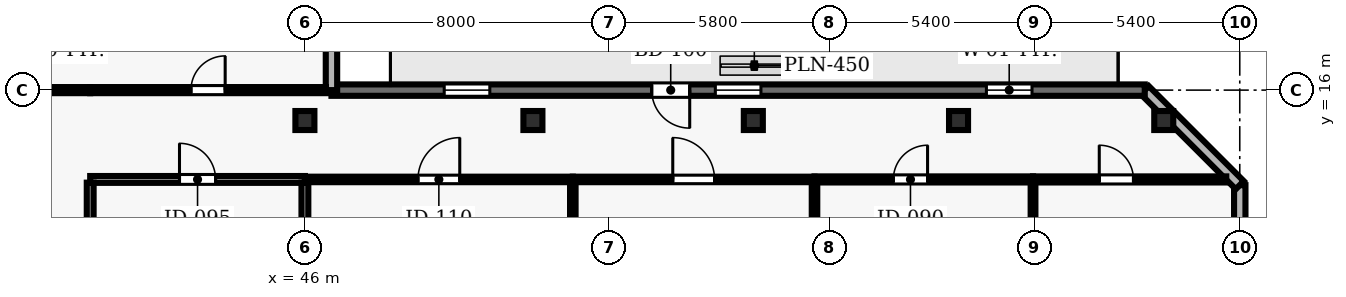
"""IFC4 building model, lengths in metres.
Left out: names, types, materials, properties, quantities, classifications, styles, units other than length and angle.
Written with IfcOpenShell. Run it as: python <this file> out.ifc"""

import sys

from ifc_helpers import new_model, si_unit, direction, frame, frame_2d, origin, origin_2d, place, context, subcontext, project, spatial, rectangle, hollow_rectangle, extrude, element, fill, save


model = new_model("IFC4")
c1 = context("Model", 3, precision=1e-05, world=origin(), true_north=direction((0.0, 1.0)))
c2 = subcontext(c1, "Body", "Model", "MODEL_VIEW")
j1 = project(units=[si_unit("LENGTHUNIT", "METRE"), si_unit("PLANEANGLEUNIT", "RADIAN")], contexts=[c1])
p1 = place(None, origin())
s1 = spatial("IfcSite", under=j1, at=p1, CompositionType="ELEMENT")
p2 = place(p1, origin())
s2 = spatial("IfcBuilding", under=s1, at=p2, CompositionType="ELEMENT")
p3 = place(p2, frame((0.0, 0.0, 134.6)))
s3 = spatial("IfcBuildingStorey", under=s2, at=p3, CompositionType="ELEMENT", Elevation=134.6)
for number, where, z_axis, x_axis in (
    (1, (46.0, 15.2, 0.0), (0.0, 0.0, 1.0), (1.0, 0.0, 0.0)),
    (2, (52.0, 15.2, 0.0), (0.0, 0.0, 1.0), (1.0, 0.0, 0.0)),
    (3, (57.8, 15.2, 0.0), (0.0, 0.0, 1.0), (1.0, 0.0, 0.0)),
    (4, (63.2, 15.2, 0.0), (0.0, 0.0, 1.0), (1.0, 0.0, 0.0)),
    (5, (68.6, 15.2, 0.0), (0.0, 0.0, 1.0), (1.0, 0.0, 0.0)),
):
    element("IfcColumn", number, at=place(p3, frame(where, z_axis=z_axis, x_axis=x_axis)), inside=s3, PredefinedType="COLUMN", context=c2, shape_type="SweptSolid", body=[
        extrude(hollow_rectangle(XDim=0.5, YDim=0.5, WallThickness=0.025, at=origin_2d()), origin(), (0.0, 0.0, 1.0), 3.9),
    ])
p4 = place(p3, frame((70.6, 2.5, 0.0), z_axis=(0.0, 0.0, 1.0), x_axis=(0.0, 1.0, 0.0)))
e6 = element("IfcWall", 6, at=p4, inside=s3, PredefinedType="SOLIDWALL", context=c2, shape_type="SweptSolid", body=[
    extrude(rectangle(XDim=11.0, YDim=0.3, at=frame_2d((5.5, 0.0))), origin(), (0.0, 0.0, 1.0), 3.69),
])
p5 = place(p4, frame((1.55, 0.0, 0.9)))
e7 = element("IfcOpeningElement", 7, at=p5, cuts=e6, PredefinedType="OPENING", context=c2, shape_type="SweptSolid", body=[
    extrude(rectangle(XDim=2.4, YDim=2.2, at=frame_2d((1.2, 1.1))), frame((0.0, 0.16, 0.0), z_axis=(0.0, -1.0, 0.0), x_axis=(1.0, 0.0, 0.0)), (0.0, 0.0, 1.0), 0.32),
])
p6 = place(p4, frame((7.05, 0.0, 0.9)))
e8 = element("IfcOpeningElement", 8, at=p6, cuts=e6, PredefinedType="OPENING", context=c2, shape_type="SweptSolid", body=[
    extrude(rectangle(XDim=2.4, YDim=2.2, at=frame_2d((1.2, 1.1))), frame((0.0, 0.16, 0.0), z_axis=(0.0, -1.0, 0.0), x_axis=(1.0, 0.0, 0.0)), (0.0, 0.0, 1.0), 0.32),
])
p7 = place(p3, frame((70.6, 13.5, 0.0), z_axis=(0.0, 0.0, 1.0), x_axis=(-0.707106781187, 0.707106781187, 0.0)))
e9 = element("IfcWall", 9, at=p7, inside=s3, PredefinedType="SOLIDWALL", context=c2, shape_type="SweptSolid", body=[
    extrude(rectangle(XDim=3.536, YDim=0.3, at=frame_2d((1.768, 0.0))), origin(), (0.0, 0.0, 1.0), 3.69),
])
p8 = place(p3, frame((68.1, 16.0, 0.0), z_axis=(0.0, 0.0, 1.0), x_axis=(-1.0, 0.0, 0.0)))
e10 = element("IfcWall", 10, at=p8, inside=s3, PredefinedType="SOLIDWALL", context=c2, shape_type="SweptSolid", body=[
    extrude(rectangle(XDim=21.401, YDim=0.3, at=frame_2d((10.701, 0.0))), origin(), (0.0, 0.0, 1.0), 3.69),
])
p9 = place(p8, frame((11.974, 0.0, 0.0)))
e11 = element("IfcOpeningElement", 11, at=p9, cuts=e10, PredefinedType="OPENING", context=c2, shape_type="SweptSolid", body=[
    extrude(rectangle(XDim=1.0, YDim=2.2, at=frame_2d((0.5, 1.1))), frame((0.0, 0.16, 0.0), z_axis=(0.0, -1.0, 0.0), x_axis=(1.0, 0.0, 0.0)), (0.0, 0.0, 1.0), 0.32),
])
p10 = place(p8, frame((2.967, 0.0, 0.9)))
e12 = element("IfcOpeningElement", 12, at=p10, cuts=e10, PredefinedType="OPENING", context=c2, shape_type="SweptSolid", body=[
    extrude(rectangle(XDim=1.2, YDim=1.6, at=frame_2d((0.6, 0.8))), frame((0.0, 0.16, 0.0), z_axis=(0.0, -1.0, 0.0), x_axis=(1.0, 0.0, 0.0)), (0.0, 0.0, 1.0), 0.32),
])
p11 = place(p8, frame((10.1, 0.0, 0.9)))
e13 = element("IfcOpeningElement", 13, at=p11, cuts=e10, PredefinedType="OPENING", context=c2, shape_type="SweptSolid", body=[
    extrude(rectangle(XDim=1.2, YDim=1.6, at=frame_2d((0.6, 0.8))), frame((0.0, 0.16, 0.0), z_axis=(0.0, -1.0, 0.0), x_axis=(1.0, 0.0, 0.0)), (0.0, 0.0, 1.0), 0.32),
])
p12 = place(p8, frame((17.234, 0.0, 0.9)))
e14 = element("IfcOpeningElement", 14, at=p12, cuts=e10, PredefinedType="OPENING", context=c2, shape_type="SweptSolid", body=[
    extrude(rectangle(XDim=1.2, YDim=1.6, at=frame_2d((0.6, 0.8))), frame((0.0, 0.16, 0.0), z_axis=(0.0, -1.0, 0.0), x_axis=(1.0, 0.0, 0.0)), (0.0, 0.0, 1.0), 0.32),
])
p13 = place(p3, frame((46.699, 16.0, 0.0), z_axis=(0.0, 0.0, 1.0), x_axis=(0.0, 1.0, 0.0)))
e15 = element("IfcWall", 15, at=p13, inside=s3, PredefinedType="SOLIDWALL", context=c2, shape_type="SweptSolid", body=[
    extrude(rectangle(XDim=9.25, YDim=0.3, at=frame_2d((4.625, 0.0))), origin(), (0.0, 0.0, 1.0), 3.69),
])
p14 = place(p13, frame((3.875, 0.0, 0.9)))
e16 = element("IfcOpeningElement", 16, at=p14, cuts=e15, PredefinedType="OPENING", context=c2, shape_type="SweptSolid", body=[
    extrude(rectangle(XDim=1.5, YDim=1.6, at=frame_2d((0.75, 0.8))), frame((0.0, 0.16, 0.0), z_axis=(0.0, -1.0, 0.0), x_axis=(1.0, 0.0, 0.0)), (0.0, 0.0, 1.0), 0.32),
])
p15 = place(p3, frame((40.35, 13.65, 0.0), z_axis=(0.0, 0.0, 1.0), x_axis=(1.0, 0.0, 0.0)))
e17 = element("IfcWall", 17, at=p15, inside=s3, PredefinedType="PARTITIONING", context=c2, shape_type="SweptSolid", body=[
    extrude(rectangle(XDim=5.65, YDim=0.18, at=frame_2d((2.825, 0.0))), origin(), (0.0, 0.0, 1.0), 3.69),
])
p16 = place(p15, frame((2.35, 0.0, 0.0)))
e18 = element("IfcOpeningElement", 18, at=p16, cuts=e17, PredefinedType="OPENING", context=c2, shape_type="SweptSolid", body=[
    extrude(rectangle(XDim=0.95, YDim=2.1, at=frame_2d((0.475, 1.05))), frame((0.0, 0.1, 0.0), z_axis=(0.0, -1.0, 0.0), x_axis=(1.0, 0.0, 0.0)), (0.0, 0.0, 1.0), 0.2),
])
p17 = place(p3, frame((40.35, 16.0, 0.0), z_axis=(0.0, 0.0, 1.0), x_axis=(-1.0, 0.0, 0.0)))
e19 = element("IfcWall", 19, at=p17, inside=s3, PredefinedType="PARTITIONING", context=c2, shape_type="SweptSolid", body=[
    extrude(rectangle(XDim=2.3, YDim=0.16, at=frame_2d((1.15, 0.0))), origin(), (0.0, 0.0, 1.0), 3.69),
])
p18 = place(p3, frame((40.35, 16.0, 0.0), z_axis=(0.0, 0.0, 1.0), x_axis=(1.0, 0.0, 0.0)))
e20 = element("IfcWall", 20, at=p18, inside=s3, PredefinedType="PARTITIONING", context=c2, shape_type="SweptSolid", body=[
    extrude(rectangle(XDim=6.204, YDim=0.16, at=frame_2d((3.102, 0.0))), origin(), (0.0, 0.0, 1.0), 3.39),
])
p19 = place(p18, frame((2.652, 0.0, 0.0)))
e21 = element("IfcOpeningElement", 21, at=p19, cuts=e20, PredefinedType="OPENING", context=c2, shape_type="SweptSolid", body=[
    extrude(rectangle(XDim=0.9, YDim=2.1, at=frame_2d((0.45, 1.05))), frame((0.0, 0.09, 0.0), z_axis=(0.0, -1.0, 0.0), x_axis=(1.0, 0.0, 0.0)), (0.0, 0.0, 1.0), 0.18),
])
p20 = place(p3, frame((46.0, 13.65, 0.0), z_axis=(0.0, 0.0, 1.0), x_axis=(1.0, 0.0, 0.0)))
e22 = element("IfcWall", 22, at=p20, inside=s3, PredefinedType="PARTITIONING", context=c2, shape_type="SweptSolid", body=[
    extrude(rectangle(XDim=7.05, YDim=0.145, at=frame_2d((3.525, 0.0))), origin(), (0.0, 0.0, 1.0), 3.69),
])
p21 = place(p20, frame((2.975, 0.0, 0.0)))
e23 = element("IfcOpeningElement", 23, at=p21, cuts=e22, PredefinedType="OPENING", context=c2, shape_type="SweptSolid", body=[
    extrude(rectangle(XDim=1.1, YDim=2.15, at=frame_2d((0.55, 1.075))), frame((0.0, 0.083, 0.0), z_axis=(0.0, -1.0, 0.0), x_axis=(1.0, 0.0, 0.0)), (0.0, 0.0, 1.0), 0.165),
])
p22 = place(p3, frame((53.05, 13.65, 0.0), z_axis=(0.0, 0.0, 1.0), x_axis=(1.0, 0.0, 0.0)))
e24 = element("IfcWall", 24, at=p22, inside=s3, PredefinedType="PARTITIONING", context=c2, shape_type="SweptSolid", body=[
    extrude(rectangle(XDim=6.36, YDim=0.145, at=frame_2d((3.18, 0.0))), origin(), (0.0, 0.0, 1.0), 3.69),
])
p23 = place(p22, frame((2.63, 0.0, 0.0)))
e25 = element("IfcOpeningElement", 25, at=p23, cuts=e24, PredefinedType="OPENING", context=c2, shape_type="SweptSolid", body=[
    extrude(rectangle(XDim=1.1, YDim=2.15, at=frame_2d((0.55, 1.075))), frame((0.0, 0.083, 0.0), z_axis=(0.0, -1.0, 0.0), x_axis=(1.0, 0.0, 0.0)), (0.0, 0.0, 1.0), 0.165),
])
p24 = place(p3, frame((59.41, 13.65, 0.0), z_axis=(0.0, 0.0, 1.0), x_axis=(1.0, 0.0, 0.0)))
e26 = element("IfcWall", 26, at=p24, inside=s3, PredefinedType="PARTITIONING", context=c2, shape_type="SweptSolid", body=[
    extrude(rectangle(XDim=5.75, YDim=0.16, at=frame_2d((2.875, 0.0))), origin(), (0.0, 0.0, 1.0), 3.69),
])
p25 = place(p24, frame((2.075, 0.0, 0.0)))
e27 = element("IfcOpeningElement", 27, at=p25, cuts=e26, PredefinedType="OPENING", context=c2, shape_type="SweptSolid", body=[
    extrude(rectangle(XDim=0.9, YDim=2.1, at=frame_2d((0.45, 1.05))), frame((0.0, 0.09, 0.0), z_axis=(0.0, -1.0, 0.0), x_axis=(1.0, 0.0, 0.0)), (0.0, 0.0, 1.0), 0.18),
])
p26 = place(p3, frame((65.16, 13.65, 0.0), z_axis=(0.0, 0.0, 1.0), x_axis=(1.0, 0.0, 0.0)))
e28 = element("IfcWall", 28, at=p26, inside=s3, PredefinedType="PARTITIONING", context=c2, shape_type="SweptSolid", body=[
    extrude(rectangle(XDim=5.085, YDim=0.16, at=frame_2d((2.542, 0.0))), origin(), (0.0, 0.0, 1.0), 3.69),
])
p27 = place(p26, frame((1.743, 0.0, 0.0)))
e29 = element("IfcOpeningElement", 29, at=p27, cuts=e28, PredefinedType="OPENING", context=c2, shape_type="SweptSolid", body=[
    extrude(rectangle(XDim=0.9, YDim=2.1, at=frame_2d((0.45, 1.05))), frame((0.0, 0.09, 0.0), z_axis=(0.0, -1.0, 0.0), x_axis=(1.0, 0.0, 0.0)), (0.0, 0.0, 1.0), 0.18),
])
p28 = place(p3, frame((40.35, 8.035, 0.0), z_axis=(0.0, 0.0, 1.0), x_axis=(0.0, 1.0, 0.0)))
e30 = element("IfcWall", 30, at=p28, inside=s3, PredefinedType="PARTITIONING", context=c2, shape_type="SweptSolid", body=[
    extrude(rectangle(XDim=5.53, YDim=0.18, at=frame_2d((2.765, 0.0))), origin(), (0.0, 0.0, 1.0), 3.69),
])
p29 = place(p3, frame((46.0, 8.035, 0.0), z_axis=(0.0, 0.0, 1.0), x_axis=(0.0, 1.0, 0.0)))
e31 = element("IfcWall", 31, at=p29, inside=s3, PredefinedType="PARTITIONING", context=c2, shape_type="SweptSolid", body=[
    extrude(rectangle(XDim=5.53, YDim=0.18, at=frame_2d((2.765, 0.0))), origin(), (0.0, 0.0, 1.0), 3.074),
])
p30 = place(p3, frame((53.05, 8.035, 0.0), z_axis=(0.0, 0.0, 1.0), x_axis=(0.0, 1.0, 0.0)))
e32 = element("IfcWall", 32, at=p30, inside=s3, PredefinedType="PARTITIONING", context=c2, shape_type="SweptSolid", body=[
    extrude(rectangle(XDim=5.547, YDim=0.145, at=frame_2d((2.773, 0.0))), origin(), (0.0, 0.0, 1.0), 3.69),
])
p31 = place(p3, frame((59.41, 8.035, 0.0), z_axis=(0.0, 0.0, 1.0), x_axis=(0.0, 1.0, 0.0)))
e33 = element("IfcWall", 33, at=p31, inside=s3, PredefinedType="PARTITIONING", context=c2, shape_type="SweptSolid", body=[
    extrude(rectangle(XDim=5.54, YDim=0.145, at=frame_2d((2.77, 0.0))), origin(), (0.0, 0.0, 1.0), 3.69),
])
p32 = place(p3, frame((65.16, 8.018, 0.0), z_axis=(0.0, 0.0, 1.0), x_axis=(0.0, 1.0, 0.0)))
e34 = element("IfcWall", 34, at=p32, inside=s3, PredefinedType="PARTITIONING", context=c2, shape_type="SweptSolid", body=[
    extrude(rectangle(XDim=5.557, YDim=0.125, at=frame_2d((2.778, 0.0))), origin(), (0.0, 0.0, 1.0), 3.69),
])
p33 = place(p9, origin())
e35 = element("IfcDoor", 35, at=p33, inside=s3, OperationType="SINGLE_SWING_LEFT", PredefinedType="DOOR", context=c2, shape_type="SweptSolid", body=[
    extrude(rectangle(XDim=1.0, YDim=2.2, at=frame_2d((0.5, 1.1))), frame((0.0, 0.025, 0.0), z_axis=(0.0, -1.0, 0.0), x_axis=(1.0, 0.0, 0.0)), (0.0, 0.0, 1.0), 0.05),
])
fill(e11, e35)
p34 = place(p10, origin())
e36 = element("IfcWindow", 36, at=p34, inside=s3, PartitioningType="SINGLE_PANEL", PredefinedType="WINDOW", context=c2, shape_type="SweptSolid", body=[
    extrude(rectangle(XDim=1.2, YDim=1.6, at=frame_2d((0.6, 0.8))), frame((0.0, 0.03, 0.0), z_axis=(0.0, -1.0, 0.0), x_axis=(1.0, 0.0, 0.0)), (0.0, 0.0, 1.0), 0.06),
])
fill(e12, e36)
p35 = place(p11, origin())
e37 = element("IfcWindow", 37, at=p35, inside=s3, PartitioningType="SINGLE_PANEL", PredefinedType="WINDOW", context=c2, shape_type="SweptSolid", body=[
    extrude(rectangle(XDim=1.2, YDim=1.6, at=frame_2d((0.6, 0.8))), frame((0.0, 0.03, 0.0), z_axis=(0.0, -1.0, 0.0), x_axis=(1.0, 0.0, 0.0)), (0.0, 0.0, 1.0), 0.06),
])
fill(e13, e37)
p36 = place(p12, origin())
e38 = element("IfcWindow", 38, at=p36, inside=s3, PartitioningType="SINGLE_PANEL", PredefinedType="WINDOW", context=c2, shape_type="SweptSolid", body=[
    extrude(rectangle(XDim=1.2, YDim=1.6, at=frame_2d((0.6, 0.8))), frame((0.0, 0.03, 0.0), z_axis=(0.0, -1.0, 0.0), x_axis=(1.0, 0.0, 0.0)), (0.0, 0.0, 1.0), 0.06),
])
fill(e14, e38)
p37 = place(p16, origin())
e39 = element("IfcDoor", 39, at=p37, inside=s3, OperationType="SINGLE_SWING_LEFT", PredefinedType="DOOR", context=c2, shape_type="SweptSolid", body=[
    extrude(rectangle(XDim=0.95, YDim=2.1, at=frame_2d((0.475, 1.05))), frame((0.0, 0.025, 0.0), z_axis=(0.0, -1.0, 0.0), x_axis=(1.0, 0.0, 0.0)), (0.0, 0.0, 1.0), 0.05),
])
fill(e18, e39)
p38 = place(p21, origin())
e40 = element("IfcDoor", 40, at=p38, inside=s3, OperationType="SINGLE_SWING_RIGHT", PredefinedType="DOOR", context=c2, shape_type="SweptSolid", body=[
    extrude(rectangle(XDim=1.1, YDim=2.15, at=frame_2d((0.55, 1.075))), frame((0.0, 0.025, 0.0), z_axis=(0.0, -1.0, 0.0), x_axis=(1.0, 0.0, 0.0)), (0.0, 0.0, 1.0), 0.05),
])
fill(e23, e40)
p39 = place(p23, origin())
e41 = element("IfcDoor", 41, at=p39, inside=s3, OperationType="SINGLE_SWING_LEFT", PredefinedType="DOOR", context=c2, shape_type="SweptSolid", body=[
    extrude(rectangle(XDim=1.1, YDim=2.15, at=frame_2d((0.55, 1.075))), frame((0.0, 0.025, 0.0), z_axis=(0.0, -1.0, 0.0), x_axis=(1.0, 0.0, 0.0)), (0.0, 0.0, 1.0), 0.05),
])
fill(e25, e41)
p40 = place(p25, origin())
e42 = element("IfcDoor", 42, at=p40, inside=s3, OperationType="SINGLE_SWING_RIGHT", PredefinedType="DOOR", context=c2, shape_type="SweptSolid", body=[
    extrude(rectangle(XDim=0.9, YDim=2.1, at=frame_2d((0.45, 1.05))), frame((0.0, 0.025, 0.0), z_axis=(0.0, -1.0, 0.0), x_axis=(1.0, 0.0, 0.0)), (0.0, 0.0, 1.0), 0.05),
])
fill(e27, e42)
p41 = place(p27, origin())
e43 = element("IfcDoor", 43, at=p41, inside=s3, OperationType="SINGLE_SWING_LEFT", PredefinedType="DOOR", context=c2, shape_type="SweptSolid", body=[
    extrude(rectangle(XDim=0.9, YDim=2.1, at=frame_2d((0.45, 1.05))), frame((0.0, 0.025, 0.0), z_axis=(0.0, -1.0, 0.0), x_axis=(1.0, 0.0, 0.0)), (0.0, 0.0, 1.0), 0.05),
])
fill(e29, e43)
p42 = place(p19, origin())
e44 = element("IfcDoor", 44, at=p42, inside=s3, OperationType="SINGLE_SWING_RIGHT", PredefinedType="DOOR", context=c2, shape_type="SweptSolid", body=[
    extrude(rectangle(XDim=0.9, YDim=2.1, at=frame_2d((0.45, 1.05))), frame((0.0, 0.025, 0.0), z_axis=(0.0, -1.0, 0.0), x_axis=(1.0, 0.0, 0.0)), (0.0, 0.0, 1.0), 0.05),
])
fill(e21, e44)
save(model, sys.argv[1])
